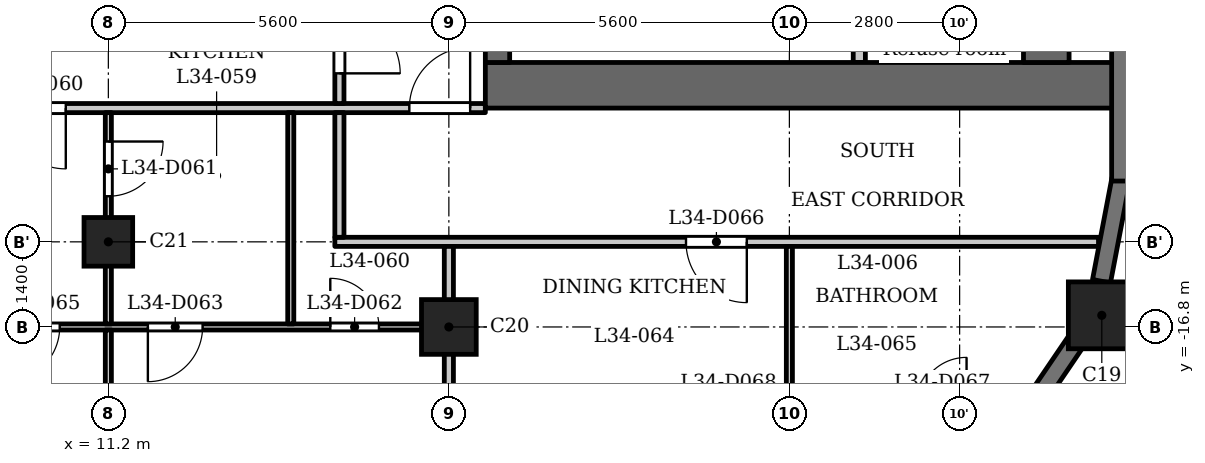
"""IFC4 building model, lengths in metres.
Left out: names, types, materials, properties, quantities, classifications, styles, units other than length and angle.
Written with IfcOpenShell. Run it as: python <this file> out.ifc"""

import sys

from ifc_helpers import new_model, si_unit, direction, frame, frame_2d, origin, origin_2d, place, context, subcontext, project, spatial, rectangle, extrude, element, fill, save


model = new_model("IFC4")
c1 = context("Model", 3, precision=1e-05, world=origin(), true_north=direction((0.0, 1.0)))
c2 = subcontext(c1, "Body", "Model", "MODEL_VIEW")
j1 = project(units=[si_unit("LENGTHUNIT", "METRE"), si_unit("PLANEANGLEUNIT", "RADIAN")], contexts=[c1])
p1 = place(None, origin())
s1 = spatial("IfcSite", under=j1, at=p1, CompositionType="ELEMENT")
p2 = place(p1, origin())
s2 = spatial("IfcBuilding", under=s1, at=p2, CompositionType="ELEMENT")
p3 = place(p2, frame((0.0, 0.0, 136.1)))
s3 = spatial("IfcBuildingStorey", under=s2, at=p3, CompositionType="ELEMENT", Elevation=136.1)
p4 = place(p3, frame((27.538, -16.609, 0.0), z_axis=(0.0, 0.0, 1.0), x_axis=(1.0, 0.0, 0.0)))
e1 = element("IfcColumn", 1, at=p4, inside=s3, PredefinedType="COLUMN", context=c2, shape_type="SweptSolid", body=[
    extrude(rectangle(XDim=1.1, YDim=1.1, at=origin_2d()), origin(), (0.0, 0.0, 1.0), 3.5),
])
p5 = place(p3, frame((16.8, -16.8, 0.0), z_axis=(0.0, 0.0, 1.0), x_axis=(1.0, 0.0, 0.0)))
e2 = element("IfcColumn", 2, at=p5, inside=s3, PredefinedType="COLUMN", context=c2, shape_type="SweptSolid", body=[
    extrude(rectangle(XDim=0.9, YDim=0.9, at=origin_2d()), origin(), (0.0, 0.0, 1.0), 3.5),
])
p6 = place(p3, frame((11.2, -15.4, 0.0), z_axis=(0.0, 0.0, 1.0), x_axis=(1.0, 0.0, 0.0)))
e3 = element("IfcColumn", 3, at=p6, inside=s3, PredefinedType="COLUMN", context=c2, shape_type="SweptSolid", body=[
    extrude(rectangle(XDim=0.8, YDim=0.8, at=origin_2d()), origin(), (0.0, 0.0, 1.0), 3.5),
])
p7 = place(p3, frame((26.532, -17.893, 0.0), z_axis=(0.0, 0.0, 1.0), x_axis=(0.562105419172, 0.82706559458, 0.0)))
e4 = element("IfcWall", 4, at=p7, inside=s3, PredefinedType="SOLIDWALL", context=c2, shape_type="SweptSolid", body=[
    extrude(rectangle(XDim=1.077, YDim=0.3, at=frame_2d((0.539, 0.0))), origin(), (0.0, 0.0, 1.0), 3.2),
])
p8 = place(p3, frame((27.533, -16.048, 0.0), z_axis=(0.0, 0.0, 1.0), x_axis=(0.187302784601, 0.982302227871, 0.0)))
e5 = element("IfcWall", 5, at=p8, inside=s3, PredefinedType="SOLIDWALL", context=c2, shape_type="SweptSolid", body=[
    extrude(rectangle(XDim=1.706, YDim=0.3, at=frame_2d((0.853, 0.0))), origin(), (0.0, 0.0, 1.0), 2.45),
])
p9 = place(p3, frame((27.85, -14.4, 0.0), z_axis=(0.0, 0.0, 1.0), x_axis=(0.0, 1.0, 0.0)))
e6 = element("IfcWall", 6, at=p9, inside=s3, PredefinedType="SOLIDWALL", context=c2, shape_type="SweptSolid", body=[
    extrude(rectangle(XDim=2.65, YDim=0.3, at=frame_2d((1.325, 0.0))), origin(), (0.0, 0.0, 1.0), 2.45),
])
p10 = place(p3, frame((17.4, -12.825, 0.0), z_axis=(0.0, 0.0, 1.0), x_axis=(1.0, 0.0, 0.0)))
e7 = element("IfcWall", 7, at=p10, inside=s3, PredefinedType="SHEAR", context=c2, shape_type="SweptSolid", body=[
    extrude(rectangle(XDim=10.4, YDim=0.75, at=frame_2d((5.2, 0.0))), origin(), (0.0, 0.0, 1.0), 3.2),
])
p11 = place(p3, frame((17.6, -12.45, 0.0), z_axis=(0.0, 0.0, 1.0), x_axis=(0.0, 1.0, 0.0)))
e8 = element("IfcWall", 8, at=p11, inside=s3, PredefinedType="SHEAR", context=c2, shape_type="SweptSolid", body=[
    extrude(rectangle(XDim=24.9, YDim=0.4, at=frame_2d((12.45, 0.0))), origin(), (0.0, 0.0, 1.0), 3.2),
])
p12 = place(p11, frame((8.65, 0.0, 0.0)))
e9 = element("IfcOpeningElement", 9, at=p12, cuts=e8, PredefinedType="OPENING", context=c2, shape_type="SweptSolid", body=[
    extrude(rectangle(XDim=0.9, YDim=2.1, at=frame_2d((0.45, 1.05))), frame((0.0, 0.21, 0.0), z_axis=(0.0, -1.0, 0.0), x_axis=(1.0, 0.0, 0.0)), (0.0, 0.0, 1.0), 0.42),
])
p13 = place(p11, frame((15.6, 0.0, 0.0)))
e10 = element("IfcOpeningElement", 10, at=p13, cuts=e8, PredefinedType="OPENING", context=c2, shape_type="SweptSolid", body=[
    extrude(rectangle(XDim=1.1, YDim=2.1, at=frame_2d((0.55, 1.05))), frame((0.0, 0.21, 0.0), z_axis=(0.0, -1.0, 0.0), x_axis=(1.0, 0.0, 0.0)), (0.0, 0.0, 1.0), 0.42),
])
p14 = place(p11, frame((18.0, 0.0, 0.0)))
e11 = element("IfcOpeningElement", 11, at=p14, cuts=e8, PredefinedType="OPENING", context=c2, shape_type="SweptSolid", body=[
    extrude(rectangle(XDim=1.1, YDim=2.1, at=frame_2d((0.55, 1.05))), frame((0.0, 0.21, 0.0), z_axis=(0.0, -1.0, 0.0), x_axis=(1.0, 0.0, 0.0)), (0.0, 0.0, 1.0), 0.42),
])
p15 = place(p11, frame((23.025, 0.0, 0.0)))
e12 = element("IfcOpeningElement", 12, at=p15, cuts=e8, PredefinedType="OPENING", context=c2, shape_type="SweptSolid", body=[
    extrude(rectangle(XDim=1.1, YDim=2.1, at=frame_2d((0.55, 1.05))), frame((0.0, 0.21, 0.0), z_axis=(0.0, -1.0, 0.0), x_axis=(1.0, 0.0, 0.0)), (0.0, 0.0, 1.0), 0.42),
])
p16 = place(p11, frame((0.775, 0.0, 0.0)))
e13 = element("IfcOpeningElement", 13, at=p16, cuts=e8, PredefinedType="OPENING", context=c2, shape_type="SweptSolid", body=[
    extrude(rectangle(XDim=1.1, YDim=2.1, at=frame_2d((0.55, 1.05))), frame((0.0, 0.21, 0.0), z_axis=(0.0, -1.0, 0.0), x_axis=(1.0, 0.0, 0.0)), (0.0, 0.0, 1.0), 0.42),
])
p17 = place(p11, frame((12.925, 0.0, 0.0)))
e14 = element("IfcOpeningElement", 14, at=p17, cuts=e8, PredefinedType="OPENING", context=c2, shape_type="SweptSolid", body=[
    extrude(rectangle(XDim=1.8, YDim=2.1, at=frame_2d((0.9, 1.05))), frame((0.0, 0.21, 0.0), z_axis=(0.0, -1.0, 0.0), x_axis=(1.0, 0.0, 0.0)), (0.0, 0.0, 1.0), 0.42),
])
p18 = place(p3, frame((26.625, -12.45, 0.0), z_axis=(0.0, 0.0, 1.0), x_axis=(0.0, 1.0, 0.0)))
e15 = element("IfcWall", 15, at=p18, inside=s3, PredefinedType="SHEAR", context=c2, shape_type="SweptSolid", body=[
    extrude(rectangle(XDim=24.9, YDim=0.75, at=frame_2d((12.45, 0.0))), origin(), (0.0, 0.0, 1.0), 3.2),
])
p19 = place(p3, frame((23.55, -12.45, 0.0), z_axis=(0.0, 0.0, 1.0), x_axis=(0.0, 1.0, 0.0)))
e16 = element("IfcWall", 16, at=p19, inside=s3, PredefinedType="PARTITIONING", context=c2, shape_type="SweptSolid", body=[
    extrude(rectangle(XDim=2.65, YDim=0.2, at=frame_2d((1.325, 0.0))), origin(), (0.0, 0.0, 1.0), 3.2),
])
p20 = place(p19, frame((0.875, 0.0, 0.0)))
e17 = element("IfcOpeningElement", 17, at=p20, cuts=e16, PredefinedType="OPENING", context=c2, shape_type="SweptSolid", body=[
    extrude(rectangle(XDim=0.9, YDim=2.1, at=frame_2d((0.45, 1.05))), frame((0.0, 0.11, 0.0), z_axis=(0.0, -1.0, 0.0), x_axis=(1.0, 0.0, 0.0)), (0.0, 0.0, 1.0), 0.22),
])
p21 = place(p3, frame((-16.725, -16.8, 0.0), z_axis=(0.0, 0.0, 1.0), x_axis=(1.0, 0.0, 0.0)))
e18 = element("IfcWall", 18, at=p21, inside=s3, PredefinedType="PARTITIONING", context=c2, shape_type="SweptSolid", body=[
    extrude(rectangle(XDim=33.45, YDim=0.1, at=frame_2d((16.725, 0.0))), origin(), (0.0, 0.0, 1.0), 3.2),
])
p22 = place(p21, frame((0.575, 0.0, 0.0)))
e19 = element("IfcOpeningElement", 19, at=p22, cuts=e18, PredefinedType="OPENING", context=c2, shape_type="SweptSolid", body=[
    extrude(rectangle(XDim=0.8, YDim=2.1, at=frame_2d((0.4, 1.05))), frame((0.0, 0.06, 0.0), z_axis=(0.0, -1.0, 0.0), x_axis=(1.0, 0.0, 0.0)), (0.0, 0.0, 1.0), 0.12),
])
p23 = place(p21, frame((6.175, 0.0, 0.0)))
e20 = element("IfcOpeningElement", 20, at=p23, cuts=e18, PredefinedType="OPENING", context=c2, shape_type="SweptSolid", body=[
    extrude(rectangle(XDim=0.9, YDim=2.1, at=frame_2d((0.45, 1.05))), frame((0.0, 0.06, 0.0), z_axis=(0.0, -1.0, 0.0), x_axis=(1.0, 0.0, 0.0)), (0.0, 0.0, 1.0), 0.12),
])
p24 = place(p21, frame((15.275, 0.0, 0.0)))
e21 = element("IfcOpeningElement", 21, at=p24, cuts=e18, PredefinedType="OPENING", context=c2, shape_type="SweptSolid", body=[
    extrude(rectangle(XDim=0.8, YDim=2.1, at=frame_2d((0.4, 1.05))), frame((0.0, 0.06, 0.0), z_axis=(0.0, -1.0, 0.0), x_axis=(1.0, 0.0, 0.0)), (0.0, 0.0, 1.0), 0.12),
])
p25 = place(p21, frame((11.775, 0.0, 0.0)))
e22 = element("IfcOpeningElement", 22, at=p25, cuts=e18, PredefinedType="OPENING", context=c2, shape_type="SweptSolid", body=[
    extrude(rectangle(XDim=0.9, YDim=2.1, at=frame_2d((0.45, 1.05))), frame((0.0, 0.06, 0.0), z_axis=(0.0, -1.0, 0.0), x_axis=(1.0, 0.0, 0.0)), (0.0, 0.0, 1.0), 0.12),
])
p26 = place(p21, frame((17.275, 0.0, 0.0)))
e23 = element("IfcOpeningElement", 23, at=p26, cuts=e18, PredefinedType="OPENING", context=c2, shape_type="SweptSolid", body=[
    extrude(rectangle(XDim=0.8, YDim=2.1, at=frame_2d((0.4, 1.05))), frame((0.0, 0.06, 0.0), z_axis=(0.0, -1.0, 0.0), x_axis=(1.0, 0.0, 0.0)), (0.0, 0.0, 1.0), 0.12),
])
p27 = place(p21, frame((20.775, 0.0, 0.0)))
e24 = element("IfcOpeningElement", 24, at=p27, cuts=e18, PredefinedType="OPENING", context=c2, shape_type="SweptSolid", body=[
    extrude(rectangle(XDim=0.9, YDim=2.1, at=frame_2d((0.45, 1.05))), frame((0.0, 0.06, 0.0), z_axis=(0.0, -1.0, 0.0), x_axis=(1.0, 0.0, 0.0)), (0.0, 0.0, 1.0), 0.12),
])
p28 = place(p21, frame((31.575, 0.0, 0.0)))
e25 = element("IfcOpeningElement", 25, at=p28, cuts=e18, PredefinedType="OPENING", context=c2, shape_type="SweptSolid", body=[
    extrude(rectangle(XDim=0.8, YDim=2.1, at=frame_2d((0.4, 1.05))), frame((0.0, 0.06, 0.0), z_axis=(0.0, -1.0, 0.0), x_axis=(1.0, 0.0, 0.0)), (0.0, 0.0, 1.0), 0.12),
])
p29 = place(p21, frame((28.575, 0.0, 0.0)))
e26 = element("IfcOpeningElement", 26, at=p29, cuts=e18, PredefinedType="OPENING", context=c2, shape_type="SweptSolid", body=[
    extrude(rectangle(XDim=0.9, YDim=2.1, at=frame_2d((0.45, 1.05))), frame((0.0, 0.06, 0.0), z_axis=(0.0, -1.0, 0.0), x_axis=(1.0, 0.0, 0.0)), (0.0, 0.0, 1.0), 0.12),
])
p30 = place(p21, frame((23.725, 0.0, 0.0)))
e27 = element("IfcOpeningElement", 27, at=p30, cuts=e18, PredefinedType="OPENING", context=c2, shape_type="SweptSolid", body=[
    extrude(rectangle(XDim=0.9, YDim=2.1, at=frame_2d((0.45, 1.05))), frame((0.0, 0.06, 0.0), z_axis=(0.0, -1.0, 0.0), x_axis=(1.0, 0.0, 0.0)), (0.0, 0.0, 1.0), 0.12),
])
p31 = place(p21, frame((26.225, 0.0, 0.0)))
e28 = element("IfcOpeningElement", 28, at=p31, cuts=e18, PredefinedType="OPENING", context=c2, shape_type="SweptSolid", body=[
    extrude(rectangle(XDim=0.9, YDim=2.1, at=frame_2d((0.45, 1.05))), frame((0.0, 0.06, 0.0), z_axis=(0.0, -1.0, 0.0), x_axis=(1.0, 0.0, 0.0)), (0.0, 0.0, 1.0), 0.12),
])
p32 = place(p3, frame((14.925, -15.4, 0.0), z_axis=(0.0, 0.0, 1.0), x_axis=(1.0, 0.0, 0.0)))
e29 = element("IfcWall", 29, at=p32, inside=s3, PredefinedType="PARTITIONING", context=c2, shape_type="SweptSolid", body=[
    extrude(rectangle(XDim=12.559, YDim=0.15, at=frame_2d((6.279, 0.0))), origin(), (0.0, 0.0, 1.0), 3.2),
])
p33 = place(p32, frame((5.775, 0.0, 0.0)))
e30 = element("IfcOpeningElement", 30, at=p33, cuts=e29, PredefinedType="OPENING", context=c2, shape_type="SweptSolid", body=[
    extrude(rectangle(XDim=1.0, YDim=2.1, at=frame_2d((0.5, 1.05))), frame((0.0, 0.085, 0.0), z_axis=(0.0, -1.0, 0.0), x_axis=(1.0, 0.0, 0.0)), (0.0, 0.0, 1.0), 0.17),
])
p34 = place(p3, frame((-17.4, -13.2, 0.0), z_axis=(0.0, 0.0, 1.0), x_axis=(1.0, 0.0, 0.0)))
e31 = element("IfcWall", 31, at=p34, inside=s3, PredefinedType="PARTITIONING", context=c2, shape_type="SweptSolid", body=[
    extrude(rectangle(XDim=34.8, YDim=0.15, at=frame_2d((17.4, 0.0))), origin(), (0.0, 0.0, 1.0), 3.2),
])
p35 = place(p34, frame((0.15, 0.0, 0.0)))
e32 = element("IfcOpeningElement", 32, at=p35, cuts=e31, PredefinedType="OPENING", context=c2, shape_type="SweptSolid", body=[
    extrude(rectangle(XDim=1.0, YDim=2.1, at=frame_2d((0.5, 1.05))), frame((0.0, 0.085, 0.0), z_axis=(0.0, -1.0, 0.0), x_axis=(1.0, 0.0, 0.0)), (0.0, 0.0, 1.0), 0.17),
])
p36 = place(p34, frame((33.55, 0.0, 0.0)))
e33 = element("IfcOpeningElement", 33, at=p36, cuts=e31, PredefinedType="OPENING", context=c2, shape_type="SweptSolid", body=[
    extrude(rectangle(XDim=1.0, YDim=2.1, at=frame_2d((0.5, 1.05))), frame((0.0, 0.085, 0.0), z_axis=(0.0, -1.0, 0.0), x_axis=(1.0, 0.0, 0.0)), (0.0, 0.0, 1.0), 0.17),
])
p37 = place(p34, frame((6.85, 0.0, 0.0)))
e34 = element("IfcOpeningElement", 34, at=p37, cuts=e31, PredefinedType="OPENING", context=c2, shape_type="SweptSolid", body=[
    extrude(rectangle(XDim=1.0, YDim=2.1, at=frame_2d((0.5, 1.05))), frame((0.0, 0.085, 0.0), z_axis=(0.0, -1.0, 0.0), x_axis=(1.0, 0.0, 0.0)), (0.0, 0.0, 1.0), 0.17),
])
p38 = place(p34, frame((12.45, 0.0, 0.0)))
e35 = element("IfcOpeningElement", 35, at=p38, cuts=e31, PredefinedType="OPENING", context=c2, shape_type="SweptSolid", body=[
    extrude(rectangle(XDim=1.0, YDim=2.1, at=frame_2d((0.5, 1.05))), frame((0.0, 0.085, 0.0), z_axis=(0.0, -1.0, 0.0), x_axis=(1.0, 0.0, 0.0)), (0.0, 0.0, 1.0), 0.17),
])
p39 = place(p34, frame((21.3, 0.0, 0.0)))
e36 = element("IfcOpeningElement", 36, at=p39, cuts=e31, PredefinedType="OPENING", context=c2, shape_type="SweptSolid", body=[
    extrude(rectangle(XDim=1.0, YDim=2.1, at=frame_2d((0.5, 1.05))), frame((0.0, 0.085, 0.0), z_axis=(0.0, -1.0, 0.0), x_axis=(1.0, 0.0, 0.0)), (0.0, 0.0, 1.0), 0.17),
])
p40 = place(p34, frame((26.9, 0.0, 0.0)))
e37 = element("IfcOpeningElement", 37, at=p40, cuts=e31, PredefinedType="OPENING", context=c2, shape_type="SweptSolid", body=[
    extrude(rectangle(XDim=1.0, YDim=2.1, at=frame_2d((0.5, 1.05))), frame((0.0, 0.085, 0.0), z_axis=(0.0, -1.0, 0.0), x_axis=(1.0, 0.0, 0.0)), (0.0, 0.0, 1.0), 0.17),
])
p41 = place(p3, frame((11.2, -22.93, 0.0), z_axis=(0.0, 0.0, 1.0), x_axis=(0.0, 1.0, 0.0)))
e38 = element("IfcWall", 38, at=p41, inside=s3, PredefinedType="PARTITIONING", context=c2, shape_type="SweptSolid", body=[
    extrude(rectangle(XDim=6.08, YDim=0.1, at=frame_2d((3.04, 0.0))), origin(), (0.0, 0.0, 1.0), 3.2),
])
p42 = place(p3, frame((11.2, -16.75, 0.0), z_axis=(0.0, 0.0, 1.0), x_axis=(0.0, 1.0, 0.0)))
e39 = element("IfcWall", 39, at=p42, inside=s3, PredefinedType="PARTITIONING", context=c2, shape_type="SweptSolid", body=[
    extrude(rectangle(XDim=3.475, YDim=0.1, at=frame_2d((1.738, 0.0))), origin(), (0.0, 0.0, 1.0), 3.2),
])
p43 = place(p42, frame((2.1, 0.0, 0.0)))
e40 = element("IfcOpeningElement", 40, at=p43, cuts=e39, PredefinedType="OPENING", context=c2, shape_type="SweptSolid", body=[
    extrude(rectangle(XDim=0.9, YDim=2.1, at=frame_2d((0.45, 1.05))), frame((0.0, 0.06, 0.0), z_axis=(0.0, -1.0, 0.0), x_axis=(1.0, 0.0, 0.0)), (0.0, 0.0, 1.0), 0.12),
])
p44 = place(p3, frame((14.2, -16.75, 0.0), z_axis=(0.0, 0.0, 1.0), x_axis=(0.0, 1.0, 0.0)))
e41 = element("IfcWall", 41, at=p44, inside=s3, PredefinedType="PARTITIONING", context=c2, shape_type="SweptSolid", body=[
    extrude(rectangle(XDim=3.475, YDim=0.1, at=frame_2d((1.738, 0.0))), origin(), (0.0, 0.0, 1.0), 3.2),
])
p45 = place(p3, frame((15.0, -15.325, 0.0), z_axis=(0.0, 0.0, 1.0), x_axis=(0.0, 1.0, 0.0)))
e42 = element("IfcWall", 42, at=p45, inside=s3, PredefinedType="PARTITIONING", context=c2, shape_type="SweptSolid", body=[
    extrude(rectangle(XDim=2.05, YDim=0.15, at=frame_2d((1.025, 0.0))), origin(), (0.0, 0.0, 1.0), 3.2),
])
p46 = place(p3, frame((15.0, -13.125, 0.0), z_axis=(0.0, 0.0, 1.0), x_axis=(0.0, 1.0, 0.0)))
e43 = element("IfcWall", 43, at=p46, inside=s3, PredefinedType="PARTITIONING", context=c2, shape_type="SweptSolid", body=[
    extrude(rectangle(XDim=6.356, YDim=0.15, at=frame_2d((3.178, 0.0))), origin(), (0.0, 0.0, 1.0), 3.2),
])
p47 = place(p46, frame((0.496, 0.0, 0.0)))
e44 = element("IfcOpeningElement", 44, at=p47, cuts=e43, PredefinedType="OPENING", context=c2, shape_type="SweptSolid", body=[
    extrude(rectangle(XDim=1.0, YDim=2.1, at=frame_2d((0.5, 1.05))), frame((0.0, 0.085, 0.0), z_axis=(0.0, -1.0, 0.0), x_axis=(1.0, 0.0, 0.0)), (0.0, 0.0, 1.0), 0.17),
])
p48 = place(p3, frame((16.8, -22.93, 0.0), z_axis=(0.0, 0.0, 1.0), x_axis=(0.0, 1.0, 0.0)))
e45 = element("IfcWall", 45, at=p48, inside=s3, PredefinedType="PARTITIONING", context=c2, shape_type="SweptSolid", body=[
    extrude(rectangle(XDim=7.455, YDim=0.15, at=frame_2d((3.728, 0.0))), origin(), (0.0, 0.0, 1.0), 3.2),
])
p49 = place(p3, frame((22.4, -18.05, 0.0), z_axis=(0.0, 0.0, 1.0), x_axis=(0.0, 1.0, 0.0)))
e46 = element("IfcWall", 46, at=p49, inside=s3, PredefinedType="PARTITIONING", context=c2, shape_type="SweptSolid", body=[
    extrude(rectangle(XDim=2.575, YDim=0.1, at=frame_2d((1.288, 0.0))), origin(), (0.0, 0.0, 1.0), 3.2),
])
p50 = place(p47, origin())
e47 = element("IfcDoor", 47, at=p50, inside=s3, OperationType="SINGLE_SWING_LEFT", PredefinedType="DOOR", context=c2, shape_type="SweptSolid", body=[
    extrude(rectangle(XDim=1.0, YDim=2.1, at=frame_2d((0.5, 1.05))), frame((0.0, 0.025, 0.0), z_axis=(0.0, -1.0, 0.0), x_axis=(1.0, 0.0, 0.0)), (0.0, 0.0, 1.0), 0.05),
])
fill(e44, e47)
p51 = place(p36, origin())
e48 = element("IfcDoor", 48, at=p51, inside=s3, OperationType="SINGLE_SWING_LEFT", PredefinedType="DOOR", context=c2, shape_type="SweptSolid", body=[
    extrude(rectangle(XDim=1.0, YDim=2.1, at=frame_2d((0.5, 1.05))), frame((0.0, 0.025, 0.0), z_axis=(0.0, -1.0, 0.0), x_axis=(1.0, 0.0, 0.0)), (0.0, 0.0, 1.0), 0.05),
])
fill(e33, e48)
p52 = place(p40, origin())
e49 = element("IfcDoor", 49, at=p52, inside=s3, OperationType="SINGLE_SWING_RIGHT", PredefinedType="DOOR", context=c2, shape_type="SweptSolid", body=[
    extrude(rectangle(XDim=1.0, YDim=2.1, at=frame_2d((0.5, 1.05))), frame((0.0, 0.025, 0.0), z_axis=(0.0, -1.0, 0.0), x_axis=(1.0, 0.0, 0.0)), (0.0, 0.0, 1.0), 0.05),
])
fill(e37, e49)
p53 = place(p43, origin())
e50 = element("IfcDoor", 50, at=p53, inside=s3, OperationType="SINGLE_SWING_RIGHT", PredefinedType="DOOR", context=c2, shape_type="SweptSolid", body=[
    extrude(rectangle(XDim=0.9, YDim=2.1, at=frame_2d((0.45, 1.05))), frame((0.0, 0.025, 0.0), z_axis=(0.0, -1.0, 0.0), x_axis=(1.0, 0.0, 0.0)), (0.0, 0.0, 1.0), 0.05),
])
fill(e40, e50)
p54 = place(p28, origin())
e51 = element("IfcDoor", 51, at=p54, inside=s3, OperationType="SINGLE_SWING_RIGHT", PredefinedType="DOOR", context=c2, shape_type="SweptSolid", body=[
    extrude(rectangle(XDim=0.8, YDim=2.1, at=frame_2d((0.4, 1.05))), frame((0.0, 0.025, 0.0), z_axis=(0.0, -1.0, 0.0), x_axis=(1.0, 0.0, 0.0)), (0.0, 0.0, 1.0), 0.05),
])
fill(e25, e51)
p55 = place(p29, origin())
e52 = element("IfcDoor", 52, at=p55, inside=s3, OperationType="SINGLE_SWING_LEFT", PredefinedType="DOOR", context=c2, shape_type="SweptSolid", body=[
    extrude(rectangle(XDim=0.9, YDim=2.1, at=frame_2d((0.45, 1.05))), frame((0.0, 0.025, 0.0), z_axis=(0.0, -1.0, 0.0), x_axis=(1.0, 0.0, 0.0)), (0.0, 0.0, 1.0), 0.05),
])
fill(e26, e52)
p56 = place(p31, origin())
e53 = element("IfcDoor", 53, at=p56, inside=s3, OperationType="SINGLE_SWING_LEFT", PredefinedType="DOOR", context=c2, shape_type="SweptSolid", body=[
    extrude(rectangle(XDim=0.9, YDim=2.1, at=frame_2d((0.45, 1.05))), frame((0.0, 0.025, 0.0), z_axis=(0.0, -1.0, 0.0), x_axis=(1.0, 0.0, 0.0)), (0.0, 0.0, 1.0), 0.05),
])
fill(e28, e53)
p57 = place(p33, origin())
e54 = element("IfcDoor", 54, at=p57, inside=s3, OperationType="SINGLE_SWING_RIGHT", PredefinedType="DOOR", context=c2, shape_type="SweptSolid", body=[
    extrude(rectangle(XDim=1.0, YDim=2.1, at=frame_2d((0.5, 1.05))), frame((0.0, 0.025, 0.0), z_axis=(0.0, -1.0, 0.0), x_axis=(1.0, 0.0, 0.0)), (0.0, 0.0, 1.0), 0.05),
])
fill(e30, e54)
save(model, sys.argv[1])
